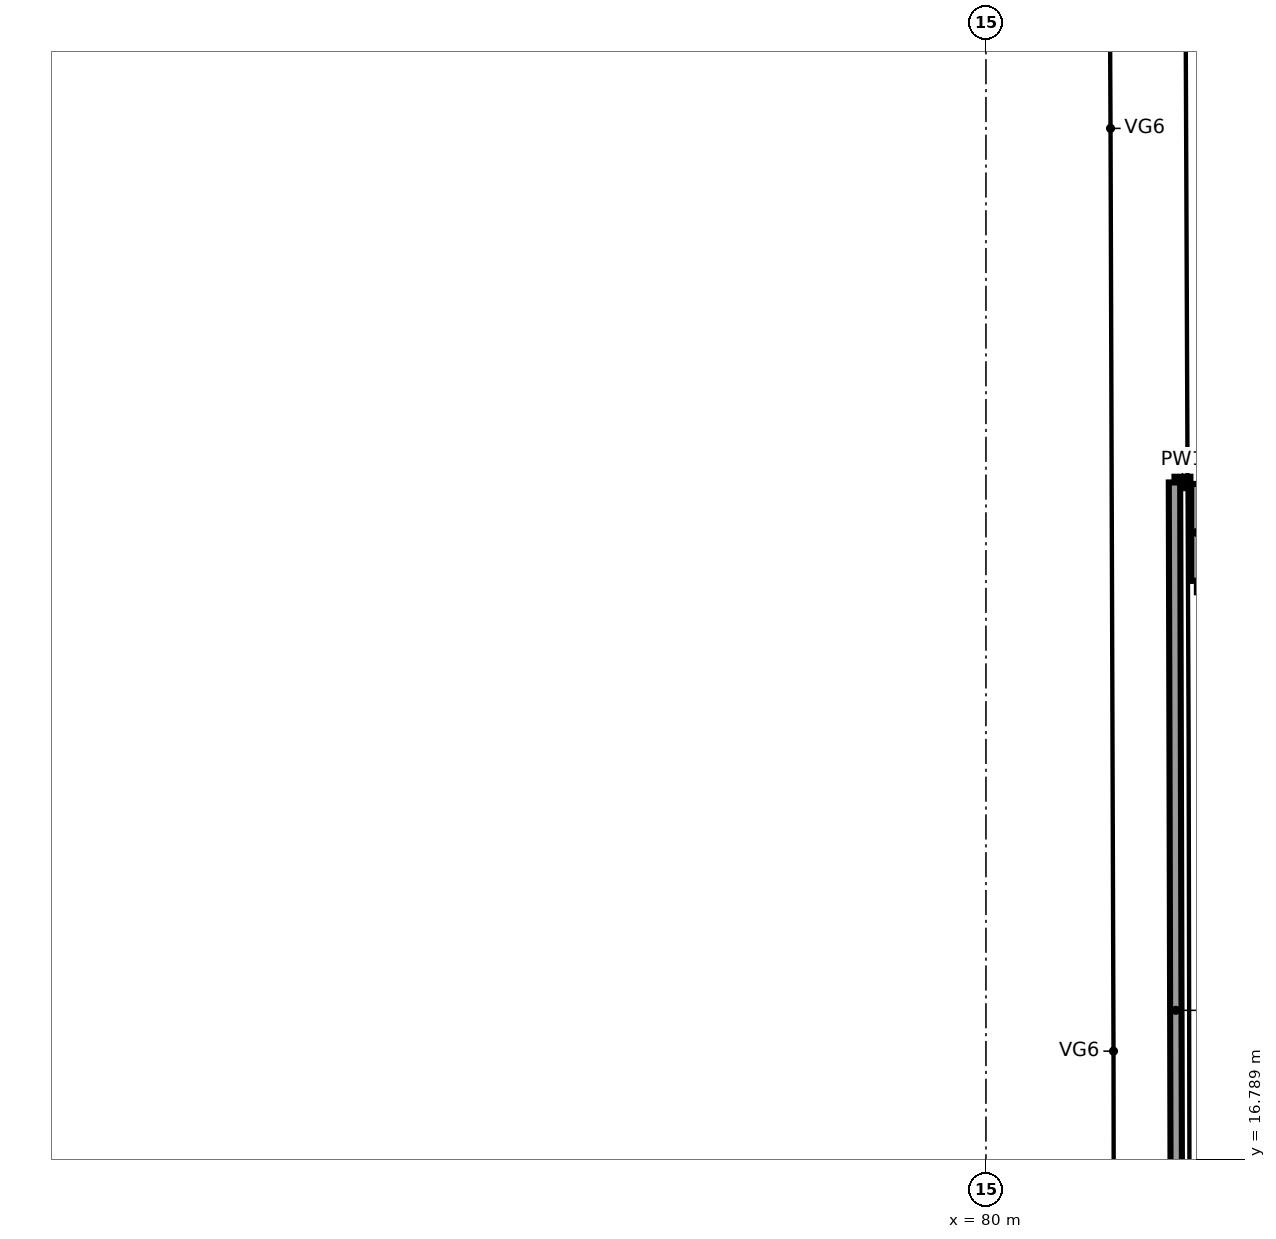
"""IFC4 building model, lengths in metres.
Left out: names, types, materials, properties, quantities, classifications, styles, units other than length and angle.
Written with IfcOpenShell. Run it as: python <this file> out.ifc"""

import sys

from ifc_helpers import new_model, si_unit, direction, frame, frame_2d, origin, place, context, subcontext, project, spatial, rectangle, extrude, element, save


model = new_model("IFC4")
c1 = context("Model", 3, precision=1e-05, world=origin(), true_north=direction((0.0, 1.0)))
c2 = subcontext(c1, "Body", "Model", "MODEL_VIEW")
j1 = project(units=[si_unit("LENGTHUNIT", "METRE"), si_unit("PLANEANGLEUNIT", "RADIAN")], contexts=[c1])
p1 = place(None, origin())
s1 = spatial("IfcSite", under=j1, at=p1, CompositionType="ELEMENT")
p2 = place(p1, origin())
s2 = spatial("IfcBuilding", under=s1, at=p2, CompositionType="ELEMENT")
p3 = place(p2, frame((0.0, 0.0, 24.0)))
s3 = spatial("IfcBuildingStorey", under=s2, at=p3, CompositionType="ELEMENT", Elevation=24.0)
for number, where, z_axis, x_axis in (
    (1, (82.775, 25.675, 0.0), (0.0, 0.0, 1.0), (0.0, -1.0, 0.0)),
    (2, (82.775, 24.325, 0.0), (0.0, 0.0, 1.0), (1.0, 0.0, 0.0)),
):
    element("IfcWall", number, at=place(p3, frame(where, z_axis=z_axis, x_axis=x_axis)), inside=s3, PredefinedType="PARTITIONING", context=c2, shape_type="SweptSolid", body=[
        extrude(rectangle(XDim=1.275, YDim=0.15, at=frame_2d((0.638, 0.0))), origin(), (0.0, 0.0, 1.0), 5.4),
    ])
p4 = place(p3, frame((82.69, 25.695, 0.0), z_axis=(0.0, 0.0, 1.0), x_axis=(-1.0, 0.0, 0.0)))
e3 = element("IfcWall", 3, at=p4, inside=s3, PredefinedType="PARTITIONING", context=c2, shape_type="SweptSolid", body=[
    extrude(rectangle(XDim=0.209, YDim=0.15, at=frame_2d((0.105, 0.0))), origin(), (0.0, 0.0, 1.0), 5.4),
])
p5 = place(p3, frame((82.48, 25.695, 0.0), z_axis=(0.0, 0.0, 1.0), x_axis=(0.002531014497, -0.999996796978, 0.0)))
e4 = element("IfcWall", 4, at=p5, inside=s3, PredefinedType="PARTITIONING", context=c2, shape_type="SweptSolid", body=[
    extrude(rectangle(XDim=13.89, YDim=0.15, at=frame_2d((6.945, 0.0))), origin(), (0.0, 0.0, 1.0), 5.4),
])
save(model, sys.argv[1])
